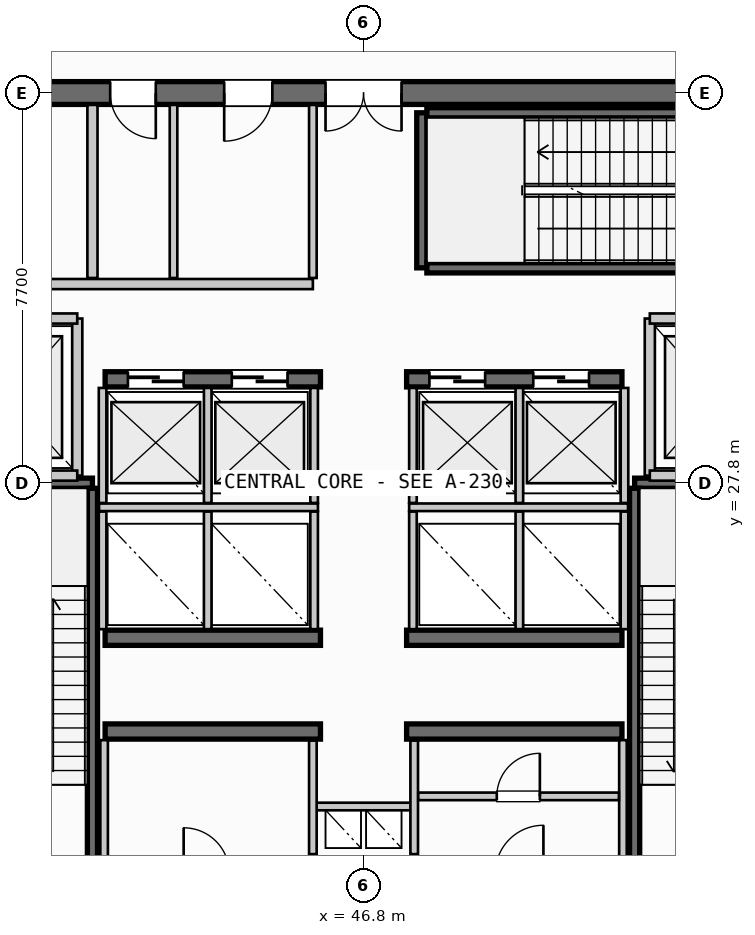
"""IFC4 building model, lengths in metres.
Left out: names, types, materials, properties, quantities, classifications, styles, units other than length and angle.
Written with IfcOpenShell. Run it as: python <this file> out.ifc"""

import sys

from ifc_helpers import new_model, si_unit, direction, frame, frame_2d, origin, place, context, subcontext, project, spatial, rectangle, extrude, source, transform, mapped, element, fill, save


model = new_model("IFC4")
c1 = context("Model", 3, precision=1e-05, world=origin(), true_north=direction((0.0, 1.0)))
c2 = subcontext(c1, "Body", "Model", "MODEL_VIEW")
j1 = project(units=[si_unit("LENGTHUNIT", "METRE"), si_unit("PLANEANGLEUNIT", "RADIAN")], contexts=[c1])
p1 = place(None, origin())
s1 = spatial("IfcSite", under=j1, at=p1, CompositionType="ELEMENT")
p2 = place(p1, origin())
s2 = spatial("IfcBuilding", under=s1, at=p2, CompositionType="ELEMENT")
p3 = place(p2, frame((0.0, 0.0, 218.4)))
s3 = spatial("IfcBuildingStorey", under=s2, at=p3, CompositionType="ELEMENT", Elevation=218.4)
p4 = place(p3, frame((55.6, 35.5, 0.0), z_axis=(0.0, 0.0, 1.0), x_axis=(-1.0, 0.0, 0.0)))
e1 = element("IfcWall", 1, at=p4, inside=s3, PredefinedType="SHEAR", context=c2, shape_type="SweptSolid", body=[
    extrude(rectangle(XDim=17.6, YDim=0.45, at=frame_2d((8.8, 0.0))), origin(), (0.0, 0.0, 1.0), 4.89),
])
p5 = place(p4, frame((8.05, 0.0, 0.0)))
e2 = element("IfcOpeningElement", 2, at=p5, cuts=e1, PredefinedType="OPENING", context=c2, shape_type="SweptSolid", body=[
    extrude(rectangle(XDim=1.5, YDim=2.2, at=frame_2d((0.75, 1.1))), frame((0.0, 0.235, 0.0), z_axis=(0.0, -1.0, 0.0), x_axis=(1.0, 0.0, 0.0)), (0.0, 0.0, 1.0), 0.47),
])
p6 = place(p4, frame((15.1, 0.0, 0.0)))
e3 = element("IfcOpeningElement", 3, at=p6, cuts=e1, PredefinedType="OPENING", context=c2, shape_type="SweptSolid", body=[
    extrude(rectangle(XDim=0.95, YDim=2.15, at=frame_2d((0.475, 1.075))), frame((0.0, 0.235, 0.0), z_axis=(0.0, -1.0, 0.0), x_axis=(1.0, 0.0, 0.0)), (0.0, 0.0, 1.0), 0.47),
])
p7 = place(p4, frame((12.9, 0.0, 0.0)))
e4 = element("IfcOpeningElement", 4, at=p7, cuts=e1, PredefinedType="OPENING", context=c2, shape_type="SweptSolid", body=[
    extrude(rectangle(XDim=0.9, YDim=2.15, at=frame_2d((0.45, 1.075))), frame((0.0, 0.235, 0.0), z_axis=(0.0, -1.0, 0.0), x_axis=(1.0, 0.0, 0.0)), (0.0, 0.0, 1.0), 0.47),
])
p8 = place(p4, frame((10.6, 0.0, 0.0)))
e5 = element("IfcOpeningElement", 5, at=p8, cuts=e1, PredefinedType="OPENING", context=c2, shape_type="SweptSolid", body=[
    extrude(rectangle(XDim=0.95, YDim=2.15, at=frame_2d((0.475, 1.075))), frame((0.0, 0.235, 0.0), z_axis=(0.0, -1.0, 0.0), x_axis=(1.0, 0.0, 0.0)), (0.0, 0.0, 1.0), 0.47),
])
for number, where, z_axis, x_axis in (
    (6, (41.7, 22.9, 0.0), (0.0, 0.0, 1.0), (1.0, 0.0, 0.0)),
    (7, (47.65, 22.9, 0.0), (0.0, 0.0, 1.0), (1.0, 0.0, 0.0)),
    (8, (41.7, 24.75, 0.0), (0.0, 0.0, 1.0), (1.0, 0.0, 0.0)),
    (9, (47.65, 24.75, 0.0), (0.0, 0.0, 1.0), (1.0, 0.0, 0.0)),
):
    element("IfcWall", number, at=place(p3, frame(where, z_axis=z_axis, x_axis=x_axis)), inside=s3, PredefinedType="SHEAR", context=c2, shape_type="SweptSolid", body=[
        extrude(rectangle(XDim=4.25, YDim=0.3, at=frame_2d((2.125, 0.0))), origin(), (0.0, 0.0, 1.0), 4.89),
    ])
p9 = place(p3, frame((41.7, 29.85, 0.0), z_axis=(0.0, 0.0, 1.0), x_axis=(1.0, 0.0, 0.0)))
e10 = element("IfcWall", 10, at=p9, inside=s3, PredefinedType="SHEAR", context=c2, shape_type="SweptSolid", body=[
    extrude(rectangle(XDim=4.25, YDim=0.3, at=frame_2d((2.125, 0.0))), origin(), (0.0, 0.0, 1.0), 4.89),
])
p10 = place(p9, frame((0.45, 0.0, 0.0)))
e11 = element("IfcOpeningElement", 11, at=p10, cuts=e10, PredefinedType="OPENING", context=c2, shape_type="SweptSolid", body=[
    extrude(rectangle(XDim=1.1, YDim=2.2, at=frame_2d((0.55, 1.1))), frame((0.0, 0.16, 0.0), z_axis=(0.0, -1.0, 0.0), x_axis=(1.0, 0.0, 0.0)), (0.0, 0.0, 1.0), 0.32),
])
p11 = place(p9, frame((2.5, 0.0, 0.0)))
e12 = element("IfcOpeningElement", 12, at=p11, cuts=e10, PredefinedType="OPENING", context=c2, shape_type="SweptSolid", body=[
    extrude(rectangle(XDim=1.1, YDim=2.2, at=frame_2d((0.55, 1.1))), frame((0.0, 0.16, 0.0), z_axis=(0.0, -1.0, 0.0), x_axis=(1.0, 0.0, 0.0)), (0.0, 0.0, 1.0), 0.32),
])
p12 = place(p3, frame((47.65, 29.85, 0.0), z_axis=(0.0, 0.0, 1.0), x_axis=(1.0, 0.0, 0.0)))
e13 = element("IfcWall", 13, at=p12, inside=s3, PredefinedType="SHEAR", context=c2, shape_type="SweptSolid", body=[
    extrude(rectangle(XDim=4.25, YDim=0.3, at=frame_2d((2.125, 0.0))), origin(), (0.0, 0.0, 1.0), 4.89),
])
p13 = place(p12, frame((0.45, 0.0, 0.0)))
e14 = element("IfcOpeningElement", 14, at=p13, cuts=e13, PredefinedType="OPENING", context=c2, shape_type="SweptSolid", body=[
    extrude(rectangle(XDim=1.1, YDim=2.2, at=frame_2d((0.55, 1.1))), frame((0.0, 0.16, 0.0), z_axis=(0.0, -1.0, 0.0), x_axis=(1.0, 0.0, 0.0)), (0.0, 0.0, 1.0), 0.32),
])
p14 = place(p12, frame((2.5, 0.0, 0.0)))
e15 = element("IfcOpeningElement", 15, at=p14, cuts=e13, PredefinedType="OPENING", context=c2, shape_type="SweptSolid", body=[
    extrude(rectangle(XDim=1.1, YDim=2.2, at=frame_2d((0.55, 1.1))), frame((0.0, 0.16, 0.0), z_axis=(0.0, -1.0, 0.0), x_axis=(1.0, 0.0, 0.0)), (0.0, 0.0, 1.0), 0.32),
])
p15 = place(p3, frame((38.39, 27.8, 0.0), z_axis=(0.0, 0.0, 1.0), x_axis=(1.0, 0.0, 0.0)))
e16 = element("IfcWall", 16, at=p15, inside=s3, PredefinedType="SHEAR", context=c2, shape_type="SweptSolid", body=[
    extrude(rectangle(XDim=3.06, YDim=0.2, at=frame_2d((1.53, 0.0))), origin(), (0.0, 0.0, 1.0), 4.89),
])
p16 = place(p3, frame((41.45, 27.7, 0.0), z_axis=(0.0, 0.0, 1.0), x_axis=(0.0, -1.0, 0.0)))
e17 = element("IfcWall", 17, at=p16, inside=s3, PredefinedType="SHEAR", context=c2, shape_type="SweptSolid", body=[
    extrude(rectangle(XDim=7.35, YDim=0.2, at=frame_2d((3.675, 0.0))), origin(), (0.0, 0.0, 1.0), 4.89),
])
p17 = place(p3, frame((52.15, 27.8, 0.0), z_axis=(0.0, 0.0, 1.0), x_axis=(1.0, 0.0, 0.0)))
e18 = element("IfcWall", 18, at=p17, inside=s3, PredefinedType="SHEAR", context=c2, shape_type="SweptSolid", body=[
    extrude(rectangle(XDim=3.06, YDim=0.2, at=frame_2d((1.53, 0.0))), origin(), (0.0, 0.0, 1.0), 4.89),
])
p18 = place(p3, frame((52.15, 20.35, 0.0), z_axis=(0.0, 0.0, 1.0), x_axis=(0.0, 1.0, 0.0)))
e19 = element("IfcWall", 19, at=p18, inside=s3, PredefinedType="SHEAR", context=c2, shape_type="SweptSolid", body=[
    extrude(rectangle(XDim=7.35, YDim=0.2, at=frame_2d((3.675, 0.0))), origin(), (0.0, 0.0, 1.0), 4.89),
])
p19 = place(p3, frame((47.95, 32.05, 0.0), z_axis=(0.0, 0.0, 1.0), x_axis=(0.0, 1.0, 0.0)))
e20 = element("IfcWall", 20, at=p19, inside=s3, PredefinedType="SHEAR", context=c2, shape_type="SweptSolid", body=[
    extrude(rectangle(XDim=3.06, YDim=0.2, at=frame_2d((1.53, 0.0))), origin(), (0.0, 0.0, 1.0), 4.89),
])
for number, where, z_axis, x_axis in (
    (21, (48.05, 35.11, 0.0), (0.0, 0.0, 1.0), (1.0, 0.0, 0.0)),
    (22, (55.4, 32.05, 0.0), (0.0, 0.0, 1.0), (-1.0, 0.0, 0.0)),
):
    element("IfcWall", number, at=place(p3, frame(where, z_axis=z_axis, x_axis=x_axis)), inside=s3, PredefinedType="SHEAR", context=c2, shape_type="SweptSolid", body=[
        extrude(rectangle(XDim=7.35, YDim=0.2, at=frame_2d((3.675, 0.0))), origin(), (0.0, 0.0, 1.0), 4.89),
    ])
p20 = place(p3, frame((45.8, 21.42, 0.0), z_axis=(0.0, 0.0, 1.0), x_axis=(1.0, 0.0, 0.0)))
e23 = element("IfcWall", 23, at=p20, inside=s3, PredefinedType="PARTITIONING", context=c2, shape_type="SweptSolid", body=[
    extrude(rectangle(XDim=2.0, YDim=0.15, at=frame_2d((1.0, 0.0))), origin(), (0.0, 0.0, 1.0), 4.265),
])
for number, where, z_axis, x_axis in (
    (24, (45.8, 20.48, 0.0), (0.0, 0.0, 1.0), (0.0, 1.0, 0.0)),
    (25, (47.8, 20.48, 0.0), (0.0, 0.0, 1.0), (0.0, 1.0, 0.0)),
):
    element("IfcWall", number, at=place(p3, frame(where, z_axis=z_axis, x_axis=x_axis)), inside=s3, PredefinedType="PARTITIONING", context=c2, shape_type="SweptSolid", body=[
        extrude(rectangle(XDim=2.24, YDim=0.15, at=frame_2d((1.12, 0.0))), origin(), (0.0, 0.0, 1.0), 4.265),
    ])
p21 = place(p3, frame((41.15, 27.95, 0.0), z_axis=(0.0, 0.0, 1.0), x_axis=(0.0, 1.0, 0.0)))
e26 = element("IfcWall", 26, at=p21, inside=s3, PredefinedType="PARTITIONING", context=c2, shape_type="SweptSolid", body=[
    extrude(rectangle(XDim=3.1, YDim=0.2, at=frame_2d((1.55, 0.0))), origin(), (0.0, 0.0, 1.0), 4.265),
])
for number, where, z_axis, x_axis in (
    (27, (38.235, 27.95, 0.0), (0.0, 0.0, 1.0), (1.0, 0.0, 0.0)),
    (28, (38.235, 31.05, 0.0), (0.0, 0.0, 1.0), (1.0, 0.0, 0.0)),
):
    element("IfcWall", number, at=place(p3, frame(where, z_axis=z_axis, x_axis=x_axis)), inside=s3, PredefinedType="PARTITIONING", context=c2, shape_type="SweptSolid", body=[
        extrude(rectangle(XDim=2.915, YDim=0.2, at=frame_2d((1.458, 0.0))), origin(), (0.0, 0.0, 1.0), 4.265),
    ])
p22 = place(p3, frame((52.45, 27.95, 0.0), z_axis=(0.0, 0.0, 1.0), x_axis=(0.0, 1.0, 0.0)))
e29 = element("IfcWall", 29, at=p22, inside=s3, PredefinedType="PARTITIONING", context=c2, shape_type="SweptSolid", body=[
    extrude(rectangle(XDim=3.1, YDim=0.2, at=frame_2d((1.55, 0.0))), origin(), (0.0, 0.0, 1.0), 4.265),
])
for number, where, z_axis, x_axis in (
    (30, (52.45, 27.95, 0.0), (0.0, 0.0, 1.0), (1.0, 0.0, 0.0)),
    (31, (52.45, 31.05, 0.0), (0.0, 0.0, 1.0), (1.0, 0.0, 0.0)),
):
    element("IfcWall", number, at=place(p3, frame(where, z_axis=z_axis, x_axis=x_axis)), inside=s3, PredefinedType="PARTITIONING", context=c2, shape_type="SweptSolid", body=[
        extrude(rectangle(XDim=2.915, YDim=0.2, at=frame_2d((1.458, 0.0))), origin(), (0.0, 0.0, 1.0), 4.265),
    ])
for number, where, z_axis, x_axis in (
    (32, (41.68, 20.335, 0.0), (0.0, 0.0, 1.0), (0.0, 1.0, 0.0)),
    (33, (51.92, 20.335, 0.0), (0.0, 0.0, 1.0), (0.0, 1.0, 0.0)),
):
    element("IfcWall", number, at=place(p3, frame(where, z_axis=z_axis, x_axis=x_axis)), inside=s3, PredefinedType="PARTITIONING", context=c2, shape_type="SweptSolid", body=[
        extrude(rectangle(XDim=2.395, YDim=0.15, at=frame_2d((1.198, 0.0))), origin(), (0.0, 0.0, 1.0), 4.265),
    ])
p23 = place(p3, frame((47.88, 21.62, 0.0), z_axis=(0.0, 0.0, 1.0), x_axis=(1.0, 0.0, 0.0)))
e34 = element("IfcWall", 34, at=p23, inside=s3, PredefinedType="PARTITIONING", context=c2, shape_type="SweptSolid", body=[
    extrude(rectangle(XDim=3.96, YDim=0.15, at=frame_2d((1.98, 0.0))), origin(), (0.0, 0.0, 1.0), 4.265),
])
p24 = place(p23, frame((1.55, 0.0, 0.0)))
e35 = element("IfcOpeningElement", 35, at=p24, cuts=e34, PredefinedType="OPENING", context=c2, shape_type="SweptSolid", body=[
    extrude(rectangle(XDim=0.85, YDim=2.15, at=frame_2d((0.425, 1.075))), frame((0.0, 0.085, 0.0), z_axis=(0.0, -1.0, 0.0), x_axis=(1.0, 0.0, 0.0)), (0.0, 0.0, 1.0), 0.17),
])
p25 = place(p3, frame((41.58, 27.325, 0.0), z_axis=(0.0, 0.0, 1.0), x_axis=(1.0, 0.0, 0.0)))
e36 = element("IfcWall", 36, at=p25, inside=s3, PredefinedType="PARTITIONING", context=c2, shape_type="SweptSolid", body=[
    extrude(rectangle(XDim=4.32, YDim=0.15, at=frame_2d((2.16, 0.0))), origin(), (0.0, 0.0, 1.0), 4.265),
])
p26 = place(p3, frame((47.7, 27.325, 0.0), z_axis=(0.0, 0.0, 1.0), x_axis=(1.0, 0.0, 0.0)))
e37 = element("IfcWall", 37, at=p26, inside=s3, PredefinedType="PARTITIONING", context=c2, shape_type="SweptSolid", body=[
    extrude(rectangle(XDim=4.32, YDim=0.15, at=frame_2d((2.16, 0.0))), origin(), (0.0, 0.0, 1.0), 4.265),
])
for number, where, z_axis, x_axis in (
    (38, (41.65, 24.92, 0.0), (0.0, 0.0, 1.0), (0.0, 1.0, 0.0)),
    (39, (43.725, 24.92, 0.0), (0.0, 0.0, 1.0), (0.0, 1.0, 0.0)),
    (40, (45.825, 24.92, 0.0), (0.0, 0.0, 1.0), (0.0, 1.0, 0.0)),
    (41, (47.775, 24.92, 0.0), (0.0, 0.0, 1.0), (0.0, 1.0, 0.0)),
    (42, (49.875, 24.92, 0.0), (0.0, 0.0, 1.0), (0.0, 1.0, 0.0)),
    (43, (51.95, 24.92, 0.0), (0.0, 0.0, 1.0), (0.0, 1.0, 0.0)),
):
    element("IfcWall", number, at=place(p3, frame(where, z_axis=z_axis, x_axis=x_axis)), inside=s3, PredefinedType="PARTITIONING", context=c2, shape_type="SweptSolid", body=[
        extrude(rectangle(XDim=2.32, YDim=0.15, at=frame_2d((1.16, 0.0))), origin(), (0.0, 0.0, 1.0), 4.265),
    ])
for number, where, z_axis, x_axis in (
    (44, (41.65, 27.41, 0.0), (0.0, 0.0, 1.0), (0.0, 1.0, 0.0)),
    (45, (43.725, 27.41, 0.0), (0.0, 0.0, 1.0), (0.0, 1.0, 0.0)),
    (46, (45.825, 27.41, 0.0), (0.0, 0.0, 1.0), (0.0, 1.0, 0.0)),
    (47, (47.775, 27.41, 0.0), (0.0, 0.0, 1.0), (0.0, 1.0, 0.0)),
    (48, (49.875, 27.41, 0.0), (0.0, 0.0, 1.0), (0.0, 1.0, 0.0)),
    (49, (51.95, 27.41, 0.0), (0.0, 0.0, 1.0), (0.0, 1.0, 0.0)),
):
    element("IfcWall", number, at=place(p3, frame(where, z_axis=z_axis, x_axis=x_axis)), inside=s3, PredefinedType="PARTITIONING", context=c2, shape_type="SweptSolid", body=[
        extrude(rectangle(XDim=2.27, YDim=0.15, at=frame_2d((1.135, 0.0))), origin(), (0.0, 0.0, 1.0), 4.265),
    ])
p27 = place(p3, frame((41.45, 31.85, 0.0), z_axis=(0.0, 0.0, 1.0), x_axis=(0.0, 1.0, 0.0)))
e50 = element("IfcWall", 50, at=p27, inside=s3, PredefinedType="PARTITIONING", context=c2, shape_type="SweptSolid", body=[
    extrude(rectangle(XDim=3.415, YDim=0.2, at=frame_2d((1.708, 0.0))), origin(), (0.0, 0.0, 1.0), 4.265),
])
p28 = place(p3, frame((38.235, 31.73, 0.0), z_axis=(0.0, 0.0, 1.0), x_axis=(1.0, 0.0, 0.0)))
e51 = element("IfcWall", 51, at=p28, inside=s3, PredefinedType="PARTITIONING", context=c2, shape_type="SweptSolid", body=[
    extrude(rectangle(XDim=7.565, YDim=0.2, at=frame_2d((3.782, 0.0))), origin(), (0.0, 0.0, 1.0), 4.265),
])
p29 = place(p3, frame((45.8, 31.85, 0.0), z_axis=(0.0, 0.0, 1.0), x_axis=(0.0, 1.0, 0.0)))
e52 = element("IfcWall", 52, at=p29, inside=s3, PredefinedType="PARTITIONING", context=c2, shape_type="SweptSolid", body=[
    extrude(rectangle(XDim=3.415, YDim=0.15, at=frame_2d((1.708, 0.0))), origin(), (0.0, 0.0, 1.0), 4.265),
])
p30 = place(p3, frame((43.05, 31.85, 0.0), z_axis=(0.0, 0.0, 1.0), x_axis=(0.0, 1.0, 0.0)))
e53 = element("IfcWall", 53, at=p30, inside=s3, PredefinedType="PLUMBINGWALL", context=c2, shape_type="SweptSolid", body=[
    extrude(rectangle(XDim=3.415, YDim=0.15, at=frame_2d((1.708, 0.0))), origin(), (0.0, 0.0, 1.0), 4.265),
])
m1 = source(origin(), c2, "Body", "SweptSolid", [
    extrude(rectangle(XDim=1.5, YDim=2.2, at=frame_2d((0.75, 1.1))), frame((0.0, 0.025, 0.0), z_axis=(0.0, -1.0, 0.0), x_axis=(1.0, 0.0, 0.0)), (0.0, 0.0, 1.0), 0.05),
])
p31 = place(p5, origin())
e54 = element("IfcDoor", 54, at=p31, inside=s3, OperationType="DOUBLE_DOOR_SINGLE_SWING", PredefinedType="DOOR", context=c2, shape_type="MappedRepresentation", body=[
    mapped(m1, transform((0.0, 0.0, 0.0), scale=1.0)),
])
fill(e2, e54)
m2 = source(origin(), c2, "Body", "SweptSolid", [
    extrude(rectangle(XDim=1.1, YDim=2.2, at=frame_2d((0.55, 1.1))), frame((0.0, 0.025, 0.0), z_axis=(0.0, -1.0, 0.0), x_axis=(1.0, 0.0, 0.0)), (0.0, 0.0, 1.0), 0.05),
])
p32 = place(p10, origin())
e55 = element("IfcDoor", 55, at=p32, inside=s3, OperationType="SLIDING_TO_LEFT", PredefinedType="DOOR", context=c2, shape_type="MappedRepresentation", body=[
    mapped(m2, transform((0.0, 0.0, 0.0), scale=1.0)),
])
fill(e11, e55)
p33 = place(p11, origin())
e56 = element("IfcDoor", 56, at=p33, inside=s3, OperationType="SLIDING_TO_LEFT", PredefinedType="DOOR", context=c2, shape_type="MappedRepresentation", body=[
    mapped(m2, transform((0.0, 0.0, 0.0), scale=1.0)),
])
fill(e12, e56)
p34 = place(p13, origin())
e57 = element("IfcDoor", 57, at=p34, inside=s3, OperationType="SLIDING_TO_LEFT", PredefinedType="DOOR", context=c2, shape_type="MappedRepresentation", body=[
    mapped(m2, transform((0.0, 0.0, 0.0), scale=1.0)),
])
fill(e14, e57)
p35 = place(p14, origin())
e58 = element("IfcDoor", 58, at=p35, inside=s3, OperationType="SLIDING_TO_LEFT", PredefinedType="DOOR", context=c2, shape_type="MappedRepresentation", body=[
    mapped(m2, transform((0.0, 0.0, 0.0), scale=1.0)),
])
fill(e15, e58)
m3 = source(origin(), c2, "Body", "SweptSolid", [
    extrude(rectangle(XDim=0.9, YDim=2.15, at=frame_2d((0.45, 1.075))), frame((0.0, 0.025, 0.0), z_axis=(0.0, -1.0, 0.0), x_axis=(1.0, 0.0, 0.0)), (0.0, 0.0, 1.0), 0.05),
])
p36 = place(p7, origin())
e59 = element("IfcDoor", 59, at=p36, inside=s3, OperationType="SINGLE_SWING_LEFT", PredefinedType="DOOR", context=c2, shape_type="MappedRepresentation", body=[
    mapped(m3, transform((0.0, 0.0, 0.0), scale=1.0)),
])
fill(e4, e59)
m4 = source(origin(), c2, "Body", "SweptSolid", [
    extrude(rectangle(XDim=0.95, YDim=2.15, at=frame_2d((0.475, 1.075))), frame((0.0, 0.025, 0.0), z_axis=(0.0, -1.0, 0.0), x_axis=(1.0, 0.0, 0.0)), (0.0, 0.0, 1.0), 0.05),
])
p37 = place(p8, origin())
e60 = element("IfcDoor", 60, at=p37, inside=s3, OperationType="SINGLE_SWING_RIGHT", PredefinedType="DOOR", context=c2, shape_type="MappedRepresentation", body=[
    mapped(m4, transform((0.0, 0.0, 0.0), scale=1.0)),
])
fill(e5, e60)
m5 = source(origin(), c2, "Body", "SweptSolid", [
    extrude(rectangle(XDim=0.85, YDim=2.15, at=frame_2d((0.425, 1.075))), frame((0.0, 0.025, 0.0), z_axis=(0.0, -1.0, 0.0), x_axis=(1.0, 0.0, 0.0)), (0.0, 0.0, 1.0), 0.05),
])
p38 = place(p24, origin())
e61 = element("IfcDoor", 61, at=p38, inside=s3, OperationType="SINGLE_SWING_RIGHT", PredefinedType="DOOR", context=c2, shape_type="MappedRepresentation", body=[
    mapped(m5, transform((0.0, 0.0, 0.0), scale=1.0)),
])
fill(e35, e61)
save(model, sys.argv[1])
